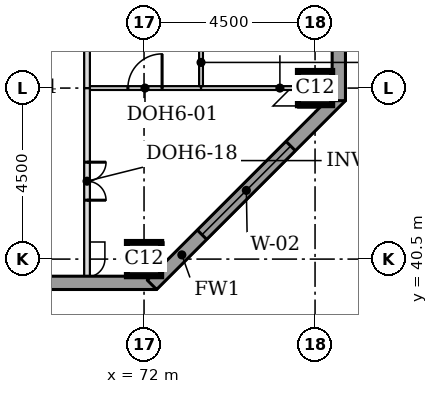
"""IFC4 building model, lengths in metres.
Left out: names, types, materials, properties, quantities, classifications, styles, units other than length and angle.
Written with IfcOpenShell. Run it as: python <this file> out.ifc"""

import sys

from ifc_helpers import new_model, si_unit, direction, frame, frame_2d, origin, origin_2d, place, context, subcontext, project, spatial, rectangle, extrude, element, fill, save


model = new_model("IFC4")
c1 = context("Model", 3, precision=1e-05, world=origin(), true_north=direction((0.0, 1.0)))
c2 = subcontext(c1, "Body", "Model", "MODEL_VIEW")
j1 = project(units=[si_unit("LENGTHUNIT", "METRE"), si_unit("PLANEANGLEUNIT", "RADIAN")], contexts=[c1])
p1 = place(None, origin())
s1 = spatial("IfcSite", under=j1, at=p1, CompositionType="ELEMENT")
p2 = place(p1, origin())
s2 = spatial("IfcBuilding", under=s1, at=p2, CompositionType="ELEMENT")
p3 = place(p2, frame((0.0, 0.0, 184.7)))
s3 = spatial("IfcBuildingStorey", under=s2, at=p3, CompositionType="ELEMENT", Elevation=184.7)
for number, where, z_axis, x_axis in (
    (1, (72.0, 40.5, 0.0), (0.0, 0.0, 1.0), (1.0, 0.0, 0.0)),
    (2, (76.5, 45.0, 0.0), (0.0, 0.0, 1.0), (1.0, 0.0, 0.0)),
):
    element("IfcColumn", number, at=place(p3, frame(where, z_axis=z_axis, x_axis=x_axis)), inside=s3, PredefinedType="COLUMN", context=c2, shape_type="SweptSolid", body=[
        extrude(rectangle(XDim=0.9, YDim=0.9, at=origin_2d()), origin(), (0.0, 0.0, 1.0), 3.7),
    ])
p4 = place(p3, frame((36.0, 39.875, 0.0), z_axis=(0.0, 0.0, 1.0), x_axis=(1.0, 0.0, 0.0)))
e3 = element("IfcWall", 3, at=p4, inside=s3, PredefinedType="STANDARD", context=c2, shape_type="SweptSolid", body=[
    extrude(rectangle(XDim=36.331, YDim=0.35, at=frame_2d((18.166, 0.0))), origin(), (0.0, 0.0, 1.0), 3.525),
])
p5 = place(p4, frame((5.1, 0.0, 0.9)))
e4 = element("IfcOpeningElement", 4, at=p5, cuts=e3, PredefinedType="OPENING", context=c2, shape_type="SweptSolid", body=[
    extrude(rectangle(XDim=3.3, YDim=1.9, at=frame_2d((1.65, 0.95))), frame((0.0, 0.185, 0.0), z_axis=(0.0, -1.0, 0.0), x_axis=(1.0, 0.0, 0.0)), (0.0, 0.0, 1.0), 0.37),
])
p6 = place(p4, frame((9.6, 0.0, 0.9)))
e5 = element("IfcOpeningElement", 5, at=p6, cuts=e3, PredefinedType="OPENING", context=c2, shape_type="SweptSolid", body=[
    extrude(rectangle(XDim=3.3, YDim=1.9, at=frame_2d((1.65, 0.95))), frame((0.0, 0.185, 0.0), z_axis=(0.0, -1.0, 0.0), x_axis=(1.0, 0.0, 0.0)), (0.0, 0.0, 1.0), 0.37),
])
p7 = place(p4, frame((14.1, 0.0, 0.9)))
e6 = element("IfcOpeningElement", 6, at=p7, cuts=e3, PredefinedType="OPENING", context=c2, shape_type="SweptSolid", body=[
    extrude(rectangle(XDim=3.3, YDim=1.9, at=frame_2d((1.65, 0.95))), frame((0.0, 0.185, 0.0), z_axis=(0.0, -1.0, 0.0), x_axis=(1.0, 0.0, 0.0)), (0.0, 0.0, 1.0), 0.37),
])
p8 = place(p4, frame((18.6, 0.0, 0.9)))
e7 = element("IfcOpeningElement", 7, at=p8, cuts=e3, PredefinedType="OPENING", context=c2, shape_type="SweptSolid", body=[
    extrude(rectangle(XDim=3.3, YDim=1.9, at=frame_2d((1.65, 0.95))), frame((0.0, 0.185, 0.0), z_axis=(0.0, -1.0, 0.0), x_axis=(1.0, 0.0, 0.0)), (0.0, 0.0, 1.0), 0.37),
])
p9 = place(p4, frame((23.1, 0.0, 0.9)))
e8 = element("IfcOpeningElement", 8, at=p9, cuts=e3, PredefinedType="OPENING", context=c2, shape_type="SweptSolid", body=[
    extrude(rectangle(XDim=3.3, YDim=1.9, at=frame_2d((1.65, 0.95))), frame((0.0, 0.185, 0.0), z_axis=(0.0, -1.0, 0.0), x_axis=(1.0, 0.0, 0.0)), (0.0, 0.0, 1.0), 0.37),
])
p10 = place(p4, frame((27.6, 0.0, 0.9)))
e9 = element("IfcOpeningElement", 9, at=p10, cuts=e3, PredefinedType="OPENING", context=c2, shape_type="SweptSolid", body=[
    extrude(rectangle(XDim=3.3, YDim=1.9, at=frame_2d((1.65, 0.95))), frame((0.0, 0.185, 0.0), z_axis=(0.0, -1.0, 0.0), x_axis=(1.0, 0.0, 0.0)), (0.0, 0.0, 1.0), 0.37),
])
p11 = place(p3, frame((72.208, 39.824, 0.0), z_axis=(0.0, 0.0, 1.0), x_axis=(0.707106781187, 0.707106781187, 0.0)))
e10 = element("IfcWall", 10, at=p11, inside=s3, PredefinedType="STANDARD", context=c2, shape_type="SweptSolid", body=[
    extrude(rectangle(XDim=7.027, YDim=0.35, at=frame_2d((3.513, 0.0))), origin(), (0.0, 0.0, 1.0), 3.525),
])
p12 = place(p11, frame((1.863, 0.0, 0.9)))
e11 = element("IfcOpeningElement", 11, at=p12, cuts=e10, PredefinedType="OPENING", context=c2, shape_type="SweptSolid", body=[
    extrude(rectangle(XDim=3.3, YDim=1.9, at=frame_2d((1.65, 0.95))), frame((0.0, 0.185, 0.0), z_axis=(0.0, -1.0, 0.0), x_axis=(1.0, 0.0, 0.0)), (0.0, 0.0, 1.0), 0.37),
])
p13 = place(p3, frame((77.125, 44.669, 0.0), z_axis=(0.0, 0.0, 1.0), x_axis=(0.0, 1.0, 0.0)))
e12 = element("IfcWall", 12, at=p13, inside=s3, PredefinedType="STANDARD", context=c2, shape_type="SweptSolid", body=[
    extrude(rectangle(XDim=32.163, YDim=0.35, at=frame_2d((16.081, 0.0))), origin(), (0.0, 0.0, 1.0), 3.525),
])
p14 = place(p13, frame((5.431, 0.0, 0.9)))
e13 = element("IfcOpeningElement", 13, at=p14, cuts=e12, PredefinedType="OPENING", context=c2, shape_type="SweptSolid", body=[
    extrude(rectangle(XDim=3.3, YDim=1.9, at=frame_2d((1.65, 0.95))), frame((0.0, 0.185, 0.0), z_axis=(0.0, -1.0, 0.0), x_axis=(1.0, 0.0, 0.0)), (0.0, 0.0, 1.0), 0.37),
])
p15 = place(p13, frame((9.931, 0.0, 0.9)))
e14 = element("IfcOpeningElement", 14, at=p15, cuts=e12, PredefinedType="OPENING", context=c2, shape_type="SweptSolid", body=[
    extrude(rectangle(XDim=3.3, YDim=1.9, at=frame_2d((1.65, 0.95))), frame((0.0, 0.185, 0.0), z_axis=(0.0, -1.0, 0.0), x_axis=(1.0, 0.0, 0.0)), (0.0, 0.0, 1.0), 0.37),
])
p16 = place(p13, frame((14.431, 0.0, 0.9)))
e15 = element("IfcOpeningElement", 15, at=p16, cuts=e12, PredefinedType="OPENING", context=c2, shape_type="SweptSolid", body=[
    extrude(rectangle(XDim=3.3, YDim=1.9, at=frame_2d((1.65, 0.95))), frame((0.0, 0.185, 0.0), z_axis=(0.0, -1.0, 0.0), x_axis=(1.0, 0.0, 0.0)), (0.0, 0.0, 1.0), 0.37),
])
p17 = place(p13, frame((18.931, 0.0, 0.9)))
e16 = element("IfcOpeningElement", 16, at=p17, cuts=e12, PredefinedType="OPENING", context=c2, shape_type="SweptSolid", body=[
    extrude(rectangle(XDim=3.3, YDim=1.9, at=frame_2d((1.65, 0.95))), frame((0.0, 0.185, 0.0), z_axis=(0.0, -1.0, 0.0), x_axis=(1.0, 0.0, 0.0)), (0.0, 0.0, 1.0), 0.37),
])
p18 = place(p13, frame((23.431, 0.0, 0.9)))
e17 = element("IfcOpeningElement", 17, at=p18, cuts=e12, PredefinedType="OPENING", context=c2, shape_type="SweptSolid", body=[
    extrude(rectangle(XDim=3.3, YDim=1.9, at=frame_2d((1.65, 0.95))), frame((0.0, 0.185, 0.0), z_axis=(0.0, -1.0, 0.0), x_axis=(1.0, 0.0, 0.0)), (0.0, 0.0, 1.0), 0.37),
])
p19 = place(p3, frame((70.575, 45.0, 0.0), z_axis=(0.0, 0.0, 1.0), x_axis=(1.0, 0.0, 0.0)))
e18 = element("IfcWall", 18, at=p19, inside=s3, PredefinedType="PARTITIONING", context=c2, shape_type="SweptSolid", body=[
    extrude(rectangle(XDim=2.925, YDim=0.1, at=frame_2d((1.462, 0.0))), origin(), (0.0, 0.0, 1.0), 3.096),
])
p20 = place(p19, frame((1.0, 0.0, 0.0)))
e19 = element("IfcOpeningElement", 19, at=p20, cuts=e18, PredefinedType="OPENING", context=c2, shape_type="SweptSolid", body=[
    extrude(rectangle(XDim=0.9, YDim=2.1, at=frame_2d((0.45, 1.05))), frame((0.0, 0.06, 0.0), z_axis=(0.0, -1.0, 0.0), x_axis=(1.0, 0.0, 0.0)), (0.0, 0.0, 1.0), 0.12),
])
p21 = place(p3, frame((73.5, 45.0, 0.0), z_axis=(0.0, 0.0, 1.0), x_axis=(1.0, 0.0, 0.0)))
e20 = element("IfcWall", 20, at=p21, inside=s3, PredefinedType="PARTITIONING", context=c2, shape_type="SweptSolid", body=[
    extrude(rectangle(XDim=2.55, YDim=0.1, at=frame_2d((1.275, 0.0))), origin(), (0.0, 0.0, 1.0), 3.096),
])
p22 = place(p3, frame((70.5, 40.05, 0.0), z_axis=(0.0, 0.0, 1.0), x_axis=(0.0, 1.0, 0.0)))
e21 = element("IfcWall", 21, at=p22, inside=s3, PredefinedType="PARTITIONING", context=c2, shape_type="SweptSolid", body=[
    extrude(rectangle(XDim=4.95, YDim=0.15, at=frame_2d((2.475, 0.0))), origin(), (0.0, 0.0, 1.0), 3.55),
])
p23 = place(p22, frame((2.0, 0.0, 0.0)))
e22 = element("IfcOpeningElement", 22, at=p23, cuts=e21, PredefinedType="OPENING", context=c2, shape_type="SweptSolid", body=[
    extrude(rectangle(XDim=1.0, YDim=2.1, at=frame_2d((0.5, 1.05))), frame((0.0, 0.085, 0.0), z_axis=(0.0, -1.0, 0.0), x_axis=(1.0, 0.0, 0.0)), (0.0, 0.0, 1.0), 0.17),
])
p24 = place(p3, frame((70.5, 45.0, 0.0), z_axis=(0.0, 0.0, 1.0), x_axis=(0.0, 1.0, 0.0)))
e23 = element("IfcWall", 23, at=p24, inside=s3, PredefinedType="PARTITIONING", context=c2, shape_type="SweptSolid", body=[
    extrude(rectangle(XDim=21.0, YDim=0.15, at=frame_2d((10.5, 0.0))), origin(), (0.0, 0.0, 1.0), 3.55),
])
p25 = place(p3, frame((73.5, 45.05, 0.0), z_axis=(0.0, 0.0, 1.0), x_axis=(0.0, 1.0, 0.0)))
e24 = element("IfcWall", 24, at=p25, inside=s3, PredefinedType="PARTITIONING", context=c2, shape_type="SweptSolid", body=[
    extrude(rectangle(XDim=4.45, YDim=0.1, at=frame_2d((2.225, 0.0))), origin(), (0.0, 0.0, 1.0), 3.55),
])
p26 = place(p25, frame((1.8, 0.0, 0.0)))
e25 = element("IfcOpeningElement", 25, at=p26, cuts=e24, PredefinedType="OPENING", context=c2, shape_type="SweptSolid", body=[
    extrude(rectangle(XDim=0.9, YDim=2.1, at=frame_2d((0.45, 1.05))), frame((0.0, 0.06, 0.0), z_axis=(0.0, -1.0, 0.0), x_axis=(1.0, 0.0, 0.0)), (0.0, 0.0, 1.0), 0.12),
])
p27 = place(p12, origin())
e26 = element("IfcWindow", 26, at=p27, inside=s3, PartitioningType="SINGLE_PANEL", PredefinedType="WINDOW", context=c2, shape_type="SweptSolid", body=[
    extrude(rectangle(XDim=3.3, YDim=1.9, at=frame_2d((1.65, 0.95))), frame((0.0, 0.085, 0.0), z_axis=(0.0, -1.0, 0.0), x_axis=(1.0, 0.0, 0.0)), (0.0, 0.0, 1.0), 0.06),
])
fill(e11, e26)
p28 = place(p23, frame((1.0, 0.0, 0.0), z_axis=(0.0, 0.0, 1.0), x_axis=(-1.0, 0.0, 0.0)))
e27 = element("IfcDoor", 27, at=p28, inside=s3, OperationType="DOUBLE_DOOR_SINGLE_SWING", PredefinedType="DOOR", context=c2, shape_type="SweptSolid", body=[
    extrude(rectangle(XDim=1.0, YDim=2.1, at=frame_2d((0.5, 1.05))), frame((0.0, 0.025, 0.0), z_axis=(0.0, -1.0, 0.0), x_axis=(1.0, 0.0, 0.0)), (0.0, 0.0, 1.0), 0.05),
])
fill(e22, e27)
p29 = place(p20, origin())
e28 = element("IfcDoor", 28, at=p29, inside=s3, OperationType="SINGLE_SWING_RIGHT", PredefinedType="DOOR", context=c2, shape_type="SweptSolid", body=[
    extrude(rectangle(XDim=0.9, YDim=2.1, at=frame_2d((0.45, 1.05))), frame((0.0, 0.025, 0.0), z_axis=(0.0, -1.0, 0.0), x_axis=(1.0, 0.0, 0.0)), (0.0, 0.0, 1.0), 0.05),
])
fill(e19, e28)
save(model, sys.argv[1])
